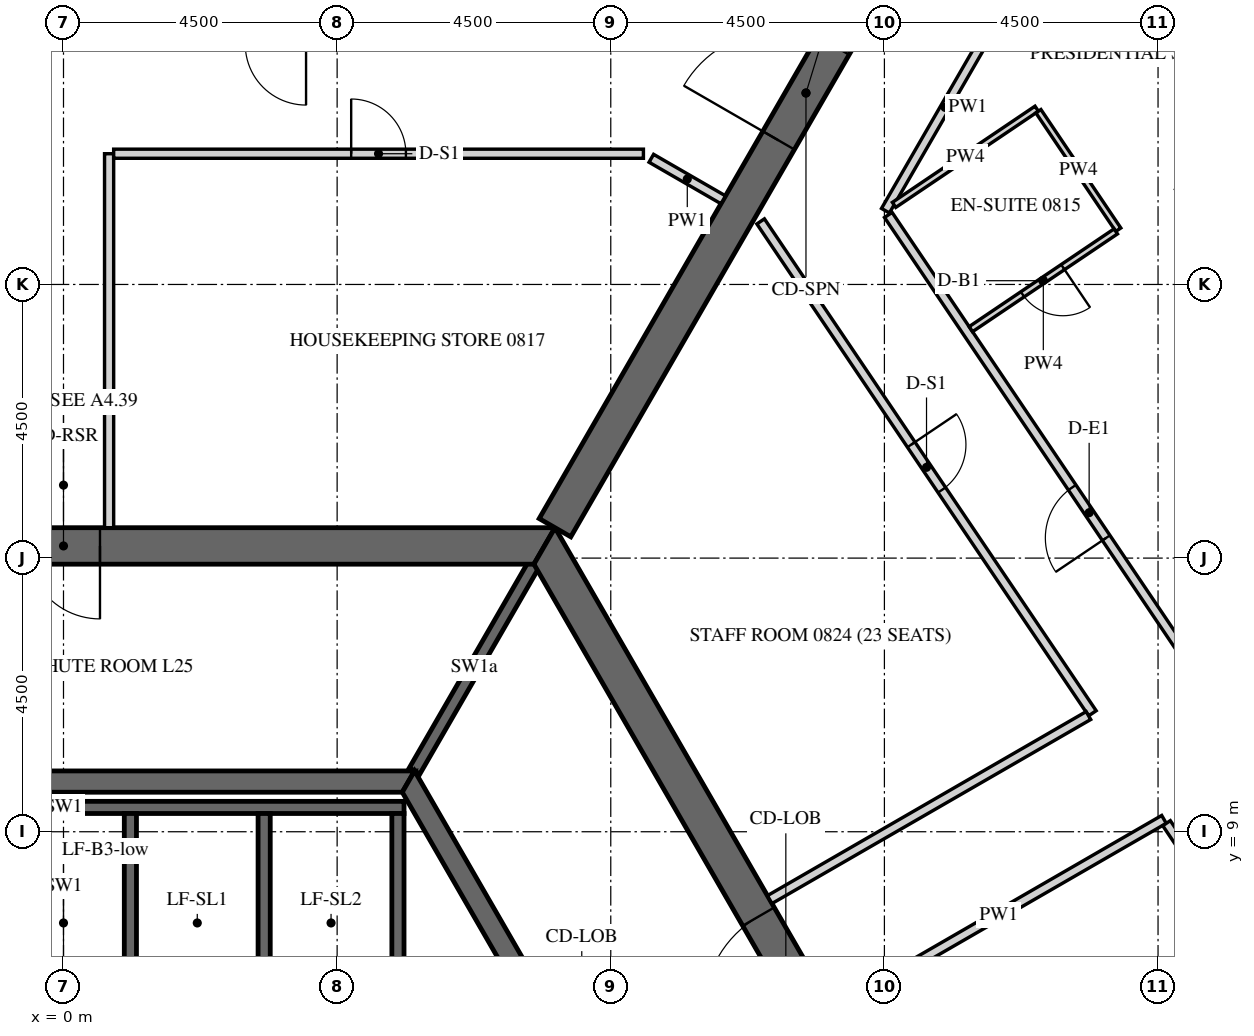
"""IFC4 building model, lengths in metres.
Left out: names, types, materials, properties, quantities, classifications, styles, units other than length and angle.
Written with IfcOpenShell. Run it as: python <this file> out.ifc"""

import sys

from ifc_helpers import new_model, si_unit, direction, frame, frame_2d, origin, place, context, subcontext, project, spatial, polyline, rectangle, outline, extrude, element, fill, save


model = new_model("IFC4")
c1 = context("Model", 3, precision=1e-05, world=origin(), true_north=direction((0.0, 1.0)))
c2 = subcontext(c1, "Body", "Model", "MODEL_VIEW")
j1 = project(units=[si_unit("LENGTHUNIT", "METRE"), si_unit("PLANEANGLEUNIT", "RADIAN")], contexts=[c1])
p1 = place(None, origin())
s1 = spatial("IfcSite", under=j1, at=p1, CompositionType="ELEMENT")
p2 = place(p1, origin())
s2 = spatial("IfcBuilding", under=s1, at=p2, CompositionType="ELEMENT")
p3 = place(p2, frame((0.0, 0.0, 111.6)))
s3 = spatial("IfcBuildingStorey", under=s2, at=p3, CompositionType="ELEMENT", Elevation=111.6)
p4 = place(p3, frame((33.728, 3.153, -0.15), z_axis=(0.0, 0.0, 1.0), x_axis=(-0.559192411416, 0.82903790445, 0.0)))
e1 = element("IfcWall", 1, at=p4, inside=s3, PredefinedType="SOLIDWALL", context=c2, shape_type="SweptSolid", body=[
    extrude(outline(polyline([(-0.026, -0.275), (30.093, -0.275), (30.048, 0.275), (0.026, 0.275), (-0.026, -0.275)])), origin(), (0.0, 0.0, 1.0), 3.9),
])
p5 = place(p4, frame((1.236, 0.0, 1.05)))
e2 = element("IfcOpeningElement", 2, at=p5, cuts=e1, PredefinedType="OPENING", context=c2, shape_type="SweptSolid", body=[
    extrude(rectangle(XDim=2.4, YDim=2.4, at=frame_2d((1.2, 1.2))), frame((0.0, 0.285, 0.0), z_axis=(0.0, -1.0, 0.0), x_axis=(1.0, 0.0, 0.0)), (0.0, 0.0, 1.0), 0.57),
])
p6 = place(p4, frame((4.835, 0.0, 1.05)))
e3 = element("IfcOpeningElement", 3, at=p6, cuts=e1, PredefinedType="OPENING", context=c2, shape_type="SweptSolid", body=[
    extrude(rectangle(XDim=2.4, YDim=2.4, at=frame_2d((1.2, 1.2))), frame((0.0, 0.285, 0.0), z_axis=(0.0, -1.0, 0.0), x_axis=(1.0, 0.0, 0.0)), (0.0, 0.0, 1.0), 0.57),
])
p7 = place(p4, frame((8.436, 0.0, 1.05)))
e4 = element("IfcOpeningElement", 4, at=p7, cuts=e1, PredefinedType="OPENING", context=c2, shape_type="SweptSolid", body=[
    extrude(rectangle(XDim=2.4, YDim=2.4, at=frame_2d((1.2, 1.2))), frame((0.0, 0.285, 0.0), z_axis=(0.0, -1.0, 0.0), x_axis=(1.0, 0.0, 0.0)), (0.0, 0.0, 1.0), 0.57),
])
p8 = place(p4, frame((12.035, 0.0, 1.05)))
e5 = element("IfcOpeningElement", 5, at=p8, cuts=e1, PredefinedType="OPENING", context=c2, shape_type="SweptSolid", body=[
    extrude(rectangle(XDim=2.4, YDim=2.4, at=frame_2d((1.2, 1.2))), frame((0.0, 0.285, 0.0), z_axis=(0.0, -1.0, 0.0), x_axis=(1.0, 0.0, 0.0)), (0.0, 0.0, 1.0), 0.57),
])
p9 = place(p4, frame((15.635, 0.0, 1.05)))
e6 = element("IfcOpeningElement", 6, at=p9, cuts=e1, PredefinedType="OPENING", context=c2, shape_type="SweptSolid", body=[
    extrude(rectangle(XDim=2.4, YDim=2.4, at=frame_2d((1.2, 1.2))), frame((0.0, 0.285, 0.0), z_axis=(0.0, -1.0, 0.0), x_axis=(1.0, 0.0, 0.0)), (0.0, 0.0, 1.0), 0.57),
])
p10 = place(p4, frame((19.236, 0.0, 1.05)))
e7 = element("IfcOpeningElement", 7, at=p10, cuts=e1, PredefinedType="OPENING", context=c2, shape_type="SweptSolid", body=[
    extrude(rectangle(XDim=2.4, YDim=2.4, at=frame_2d((1.2, 1.2))), frame((0.0, 0.285, 0.0), z_axis=(0.0, -1.0, 0.0), x_axis=(1.0, 0.0, 0.0)), (0.0, 0.0, 1.0), 0.57),
])
p11 = place(p4, frame((22.835, 0.0, 1.05)))
e8 = element("IfcOpeningElement", 8, at=p11, cuts=e1, PredefinedType="OPENING", context=c2, shape_type="SweptSolid", body=[
    extrude(rectangle(XDim=2.4, YDim=2.4, at=frame_2d((1.2, 1.2))), frame((0.0, 0.285, 0.0), z_axis=(0.0, -1.0, 0.0), x_axis=(1.0, 0.0, 0.0)), (0.0, 0.0, 1.0), 0.57),
])
p12 = place(p4, frame((26.436, 0.0, 1.05)))
e9 = element("IfcOpeningElement", 9, at=p12, cuts=e1, PredefinedType="OPENING", context=c2, shape_type="SweptSolid", body=[
    extrude(rectangle(XDim=2.4, YDim=2.4, at=frame_2d((1.2, 1.2))), frame((0.0, 0.285, 0.0), z_axis=(0.0, -1.0, 0.0), x_axis=(1.0, 0.0, 0.0)), (0.0, 0.0, 1.0), 0.57),
])
p13 = place(p3, frame((15.819, 0.0, -0.15), z_axis=(0.0, 0.0, 1.0), x_axis=(-0.499999880136, 0.866025472988, 0.0)))
e10 = element("IfcWall", 10, at=p13, inside=s3, PredefinedType="SHEAR", context=c2, shape_type="SweptSolid", body=[
    extrude(outline(polyline([(-0.173, -0.3), (15.993, -0.3), (15.646, 0.3), (0.173, 0.3), (-0.173, -0.3)])), origin(), (0.0, 0.0, 1.0), 3.9),
])
p14 = place(p13, frame((6.981, 0.0, 0.15)))
e11 = element("IfcOpeningElement", 11, at=p14, cuts=e10, PredefinedType="OPENING", context=c2, shape_type="SweptSolid", body=[
    extrude(rectangle(XDim=1.8, YDim=2.4, at=frame_2d((0.9, 1.2))), frame((0.0, 0.31, 0.0), z_axis=(0.0, -1.0, 0.0), x_axis=(1.0, 0.0, 0.0)), (0.0, 0.0, 1.0), 0.62),
])
p15 = place(p3, frame((7.91, 13.7, -0.15), z_axis=(0.0, 0.0, 1.0), x_axis=(-1.0, 0.0, 0.0)))
e12 = element("IfcWall", 12, at=p15, inside=s3, PredefinedType="SHEAR", context=c2, shape_type="SweptSolid", body=[
    extrude(outline(polyline([(-0.173, -0.3), (15.993, -0.3), (15.646, 0.3), (0.173, 0.3), (-0.173, -0.3)])), origin(), (0.0, 0.0, 1.0), 3.9),
])
p16 = place(p15, frame((7.31, 0.0, 0.15)))
e13 = element("IfcOpeningElement", 13, at=p16, cuts=e12, PredefinedType="OPENING", context=c2, shape_type="SweptSolid", body=[
    extrude(rectangle(XDim=1.2, YDim=2.4, at=frame_2d((0.6, 1.2))), frame((0.0, 0.31, 0.0), z_axis=(0.0, -1.0, 0.0), x_axis=(1.0, 0.0, 0.0)), (0.0, 0.0, 1.0), 0.62),
])
p17 = place(p3, frame((8.083, 14.0, -0.15), z_axis=(0.0, 0.0, 1.0), x_axis=(0.499997680643, 0.866026742862, 0.0)))
e14 = element("IfcWall", 14, at=p17, inside=s3, PredefinedType="SHEAR", context=c2, shape_type="SweptSolid", body=[
    extrude(rectangle(XDim=16.509, YDim=0.6, at=frame_2d((8.254, 0.0))), origin(), (0.0, 0.0, 1.0), 3.9),
])
p18 = place(p17, frame((7.354, 0.0, 0.15)))
e15 = element("IfcOpeningElement", 15, at=p18, cuts=e14, PredefinedType="OPENING", context=c2, shape_type="SweptSolid", body=[
    extrude(rectangle(XDim=1.8, YDim=2.4, at=frame_2d((0.9, 1.2))), frame((0.0, 0.31, 0.0), z_axis=(0.0, -1.0, 0.0), x_axis=(1.0, 0.0, 0.0)), (0.0, 0.0, 1.0), 0.62),
])
p19 = place(p3, frame((11.345, 0.0, -0.15), z_axis=(0.0, 0.0, 1.0), x_axis=(-0.499995046907, 0.866028263435, 0.0)))
e16 = element("IfcWall", 16, at=p19, inside=s3, PredefinedType="SHEAR", context=c2, shape_type="SweptSolid", body=[
    extrude(outline(polyline([(-0.101, -0.175), (11.446, -0.175), (11.244, 0.175), (0.101, 0.175), (-0.101, -0.175)])), origin(), (0.0, 0.0, 1.0), 3.9),
])
p20 = place(p19, frame((4.744, 0.0, 0.15)))
e17 = element("IfcOpeningElement", 17, at=p20, cuts=e16, PredefinedType="OPENING", context=c2, shape_type="SweptSolid", body=[
    extrude(rectangle(XDim=1.8, YDim=2.4, at=frame_2d((0.9, 1.2))), frame((0.0, 0.185, 0.0), z_axis=(0.0, -1.0, 0.0), x_axis=(1.0, 0.0, 0.0)), (0.0, 0.0, 1.0), 0.37),
])
p21 = place(p3, frame((5.673, 9.825, -0.15), z_axis=(0.0, 0.0, 1.0), x_axis=(-1.0, 0.0, 0.0)))
e18 = element("IfcWall", 18, at=p21, inside=s3, PredefinedType="SHEAR", context=c2, shape_type="SweptSolid", body=[
    extrude(outline(polyline([(-0.101, -0.175), (11.446, -0.175), (11.244, 0.175), (0.101, 0.175), (-0.101, -0.175)])), origin(), (0.0, 0.0, 1.0), 3.9),
])
p22 = place(p3, frame((-5.6, 9.4, -0.25), z_axis=(0.0, 0.0, 1.0), x_axis=(1.0, 0.0, 0.0)))
e19 = element("IfcWall", 19, at=p22, inside=s3, PredefinedType="SHEAR", context=c2, shape_type="SweptSolid", body=[
    extrude(rectangle(XDim=11.2, YDim=0.2, at=frame_2d((5.6, 0.0))), origin(), (0.0, 0.0, 1.0), 3.9),
])
for number, where, z_axis, x_axis in (
    (20, (1.1, 6.4, -0.25), (0.0, 0.0, 1.0), (0.0, 1.0, 0.0)),
    (21, (3.3, 6.4, -0.25), (0.0, 0.0, 1.0), (0.0, 1.0, 0.0)),
    (22, (5.5, 6.4, -0.25), (0.0, 0.0, 1.0), (0.0, 1.0, 0.0)),
):
    element("IfcWall", number, at=place(p3, frame(where, z_axis=z_axis, x_axis=x_axis)), inside=s3, PredefinedType="SHEAR", context=c2, shape_type="SweptSolid", body=[
        extrude(rectangle(XDim=2.9, YDim=0.2, at=frame_2d((1.45, 0.0))), origin(), (0.0, 0.0, 1.0), 3.9),
    ])
p23 = place(p3, frame((5.773, 10.0, -0.15), z_axis=(0.0, 0.0, 1.0), x_axis=(0.500038251005, 0.86600331843, 0.0)))
e23 = element("IfcWall", 23, at=p23, inside=s3, PredefinedType="SHEAR", context=c2, shape_type="SweptSolid", body=[
    extrude(rectangle(XDim=3.926, YDim=0.2, at=frame_2d((1.963, 0.0))), origin(), (0.0, 0.0, 1.0), 3.9),
])
p24 = place(p3, frame((0.75, 14.0, 0.0), z_axis=(0.0, 0.0, 1.0), x_axis=(0.0, 1.0, 0.0)))
e24 = element("IfcWall", 24, at=p24, inside=s3, PredefinedType="PARTITIONING", context=c2, shape_type="SweptSolid", body=[
    extrude(rectangle(XDim=6.15, YDim=0.15, at=frame_2d((3.075, 0.0))), origin(), (0.0, 0.0, 1.0), 2.988),
])
p25 = place(p3, frame((0.825, 20.15, 0.0), z_axis=(0.0, 0.0, 1.0), x_axis=(1.0, 0.0, 0.0)))
e25 = element("IfcWall", 25, at=p25, inside=s3, PredefinedType="PARTITIONING", context=c2, shape_type="SweptSolid", body=[
    extrude(rectangle(XDim=8.712, YDim=0.15, at=frame_2d((4.356, 0.0))), origin(), (0.0, 0.0, 1.0), 2.988),
])
p26 = place(p25, frame((3.906, 0.0, 0.0)))
e26 = element("IfcOpeningElement", 26, at=p26, cuts=e25, PredefinedType="OPENING", context=c2, shape_type="SweptSolid", body=[
    extrude(rectangle(XDim=0.9, YDim=2.1, at=frame_2d((0.45, 1.05))), frame((0.0, 0.085, 0.0), z_axis=(0.0, -1.0, 0.0), x_axis=(1.0, 0.0, 0.0)), (0.0, 0.0, 1.0), 0.17),
])
p27 = place(p3, frame((9.667, 20.075, 0.0), z_axis=(0.0, 0.0, 1.0), x_axis=(0.866000994684, -0.500042275419, 0.0)))
e27 = element("IfcWall", 27, at=p27, inside=s3, PredefinedType="PARTITIONING", context=c2, shape_type="SweptSolid", body=[
    extrude(rectangle(XDim=1.366, YDim=0.15, at=frame_2d((0.683, 0.0))), origin(), (0.0, 0.0, 1.0), 2.988),
])
p28 = place(p3, frame((25.821, 0.972, 0.0), z_axis=(0.0, 0.0, 1.0), x_axis=(-0.559192946342, 0.829037543638, 0.0)))
e28 = element("IfcWall", 28, at=p28, inside=s3, PredefinedType="PARTITIONING", context=c2, shape_type="SweptSolid", body=[
    extrude(rectangle(XDim=21.918, YDim=0.15, at=frame_2d((10.959, 0.0))), origin(), (0.0, 0.0, 1.0), 2.988),
])
p29 = place(p28, frame((6.969, 0.0, 0.0)))
e29 = element("IfcOpeningElement", 29, at=p29, cuts=e28, PredefinedType="OPENING", context=c2, shape_type="SweptSolid", body=[
    extrude(rectangle(XDim=1.0, YDim=2.1, at=frame_2d((0.5, 1.05))), frame((0.0, 0.085, 0.0), z_axis=(0.0, -1.0, 0.0), x_axis=(1.0, 0.0, 0.0)), (0.0, 0.0, 1.0), 0.17),
])
p30 = place(p28, frame((15.511, 0.0, 0.0)))
e30 = element("IfcOpeningElement", 30, at=p30, cuts=e28, PredefinedType="OPENING", context=c2, shape_type="SweptSolid", body=[
    extrude(rectangle(XDim=1.0, YDim=2.1, at=frame_2d((0.5, 1.05))), frame((0.0, 0.085, 0.0), z_axis=(0.0, -1.0, 0.0), x_axis=(1.0, 0.0, 0.0)), (0.0, 0.0, 1.0), 0.17),
])
p31 = place(p3, frame((13.517, 19.213, 0.0), z_axis=(0.0, 0.0, 1.0), x_axis=(0.499981033738, 0.866036353684, 0.0)))
e31 = element("IfcWall", 31, at=p31, inside=s3, PredefinedType="PARTITIONING", context=c2, shape_type="SweptSolid", body=[
    extrude(rectangle(XDim=3.923, YDim=0.15, at=frame_2d((1.961, 0.0))), origin(), (0.0, 0.0, 1.0), 2.988),
])
p32 = place(p3, frame((12.664, 6.066, 0.0), z_axis=(0.0, 0.0, 1.0), x_axis=(0.866036561919, 0.499980673046, 0.0)))
e32 = element("IfcWall", 32, at=p32, inside=s3, PredefinedType="PARTITIONING", context=c2, shape_type="SweptSolid", body=[
    extrude(rectangle(XDim=6.275, YDim=0.15, at=frame_2d((3.137, 0.0))), origin(), (0.0, 0.0, 1.0), 2.988),
])
p33 = place(p3, frame((18.14, 9.141, 0.0), z_axis=(0.0, 0.0, 1.0), x_axis=(0.55918799196, -0.829040885389, 0.0)))
e33 = element("IfcWall", 33, at=p33, inside=s3, PredefinedType="PARTITIONING", context=c2, shape_type="SweptSolid", body=[
    extrude(rectangle(XDim=10.025, YDim=0.15, at=frame_2d((5.013, 0.0))), origin(), (0.0, 0.0, 1.0), 2.988),
])
p34 = place(p3, frame((11.465, 19.037, 0.0), z_axis=(0.0, 0.0, 1.0), x_axis=(0.559196064773, -0.829035440221, 0.0)))
e34 = element("IfcWall", 34, at=p34, inside=s3, PredefinedType="PARTITIONING", context=c2, shape_type="SweptSolid", body=[
    extrude(rectangle(XDim=9.757, YDim=0.15, at=frame_2d((4.878, 0.0))), origin(), (0.0, 0.0, 1.0), 2.988),
])
p35 = place(p34, frame((4.428, 0.0, 0.0)))
e35 = element("IfcOpeningElement", 35, at=p35, cuts=e34, PredefinedType="OPENING", context=c2, shape_type="SweptSolid", body=[
    extrude(rectangle(XDim=0.9, YDim=2.1, at=frame_2d((0.45, 1.05))), frame((0.0, 0.085, 0.0), z_axis=(0.0, -1.0, 0.0), x_axis=(1.0, 0.0, 0.0)), (0.0, 0.0, 1.0), 0.17),
])
p36 = place(p3, frame((16.855, 10.911, 0.0), z_axis=(0.0, 0.0, 1.0), x_axis=(-0.866020343444, -0.500008764664, 0.0)))
e36 = element("IfcWall", 36, at=p36, inside=s3, PredefinedType="PARTITIONING", context=c2, shape_type="SweptSolid", body=[
    extrude(rectangle(XDim=6.053, YDim=0.15, at=frame_2d((3.026, 0.0))), origin(), (0.0, 0.0, 1.0), 2.988),
])
p37 = place(p3, frame((13.659, 19.308, 0.0), z_axis=(0.0, 0.0, 1.0), x_axis=(0.829010718334, 0.559232714429, 0.0)))
e37 = element("IfcWall", 37, at=p37, inside=s3, PredefinedType="PARTITIONING", context=c2, shape_type="SweptSolid", body=[
    extrude(rectangle(XDim=2.829, YDim=0.1, at=frame_2d((1.415, 0.0))), origin(), (0.0, 0.0, 1.0), 2.988),
])
p38 = place(p3, frame((16.032, 20.849, 0.0), z_axis=(0.0, 0.0, 1.0), x_axis=(0.559151632687, -0.829065408555, 0.0)))
e38 = element("IfcWall", 38, at=p38, inside=s3, PredefinedType="PARTITIONING", context=c2, shape_type="SweptSolid", body=[
    extrude(rectangle(XDim=2.35, YDim=0.1, at=frame_2d((1.175, 0.0))), origin(), (0.0, 0.0, 1.0), 2.988),
])
p39 = place(p3, frame((17.305, 18.873, 0.0), z_axis=(0.0, 0.0, 1.0), x_axis=(-0.82904649496, -0.559179675234, 0.0)))
e39 = element("IfcWall", 39, at=p39, inside=s3, PredefinedType="PARTITIONING", context=c2, shape_type="SweptSolid", body=[
    extrude(rectangle(XDim=2.875, YDim=0.1, at=frame_2d((1.438, 0.0))), origin(), (0.0, 0.0, 1.0), 2.988),
])
p40 = place(p39, frame((1.05, 0.0, 0.0)))
e40 = element("IfcOpeningElement", 40, at=p40, cuts=e39, PredefinedType="OPENING", context=c2, shape_type="SweptSolid", body=[
    extrude(rectangle(XDim=0.8, YDim=2.1, at=frame_2d((0.4, 1.05))), frame((0.0, 0.06, 0.0), z_axis=(0.0, -1.0, 0.0), x_axis=(1.0, 0.0, 0.0)), (0.0, 0.0, 1.0), 0.12),
])
p41 = place(p14, origin())
e41 = element("IfcDoor", 41, at=p41, inside=s3, OperationType="DOUBLE_DOOR_SINGLE_SWING", PredefinedType="DOOR", context=c2, shape_type="SweptSolid", body=[
    extrude(rectangle(XDim=1.8, YDim=2.4, at=frame_2d((0.9, 1.2))), frame((0.0, 0.025, 0.0), z_axis=(0.0, -1.0, 0.0), x_axis=(1.0, 0.0, 0.0)), (0.0, 0.0, 1.0), 0.05),
])
fill(e11, e41)
p42 = place(p16, origin())
e42 = element("IfcDoor", 42, at=p42, inside=s3, OperationType="SINGLE_SWING_LEFT", PredefinedType="DOOR", context=c2, shape_type="SweptSolid", body=[
    extrude(rectangle(XDim=1.2, YDim=2.4, at=frame_2d((0.6, 1.2))), frame((0.0, 0.025, 0.0), z_axis=(0.0, -1.0, 0.0), x_axis=(1.0, 0.0, 0.0)), (0.0, 0.0, 1.0), 0.05),
])
fill(e13, e42)
p43 = place(p18, origin())
e43 = element("IfcDoor", 43, at=p43, inside=s3, OperationType="DOUBLE_DOOR_SINGLE_SWING", PredefinedType="DOOR", context=c2, shape_type="SweptSolid", body=[
    extrude(rectangle(XDim=1.8, YDim=2.4, at=frame_2d((0.9, 1.2))), frame((0.0, 0.025, 0.0), z_axis=(0.0, -1.0, 0.0), x_axis=(1.0, 0.0, 0.0)), (0.0, 0.0, 1.0), 0.05),
])
fill(e15, e43)
p44 = place(p30, origin())
e44 = element("IfcDoor", 44, at=p44, inside=s3, OperationType="SINGLE_SWING_LEFT", PredefinedType="DOOR", context=c2, shape_type="SweptSolid", body=[
    extrude(rectangle(XDim=1.0, YDim=2.1, at=frame_2d((0.5, 1.05))), frame((0.0, 0.025, 0.0), z_axis=(0.0, -1.0, 0.0), x_axis=(1.0, 0.0, 0.0)), (0.0, 0.0, 1.0), 0.05),
])
fill(e30, e44)
p45 = place(p40, origin())
e45 = element("IfcDoor", 45, at=p45, inside=s3, OperationType="SINGLE_SWING_LEFT", PredefinedType="DOOR", context=c2, shape_type="SweptSolid", body=[
    extrude(rectangle(XDim=0.8, YDim=2.1, at=frame_2d((0.4, 1.05))), frame((0.0, 0.025, 0.0), z_axis=(0.0, -1.0, 0.0), x_axis=(1.0, 0.0, 0.0)), (0.0, 0.0, 1.0), 0.05),
])
fill(e40, e45)
p46 = place(p26, origin())
e46 = element("IfcDoor", 46, at=p46, inside=s3, OperationType="SINGLE_SWING_RIGHT", PredefinedType="DOOR", context=c2, shape_type="SweptSolid", body=[
    extrude(rectangle(XDim=0.9, YDim=2.1, at=frame_2d((0.45, 1.05))), frame((0.0, 0.025, 0.0), z_axis=(0.0, -1.0, 0.0), x_axis=(1.0, 0.0, 0.0)), (0.0, 0.0, 1.0), 0.05),
])
fill(e26, e46)
p47 = place(p35, origin())
e47 = element("IfcDoor", 47, at=p47, inside=s3, OperationType="SINGLE_SWING_RIGHT", PredefinedType="DOOR", context=c2, shape_type="SweptSolid", body=[
    extrude(rectangle(XDim=0.9, YDim=2.1, at=frame_2d((0.45, 1.05))), frame((0.0, 0.025, 0.0), z_axis=(0.0, -1.0, 0.0), x_axis=(1.0, 0.0, 0.0)), (0.0, 0.0, 1.0), 0.05),
])
fill(e35, e47)
save(model, sys.argv[1])
